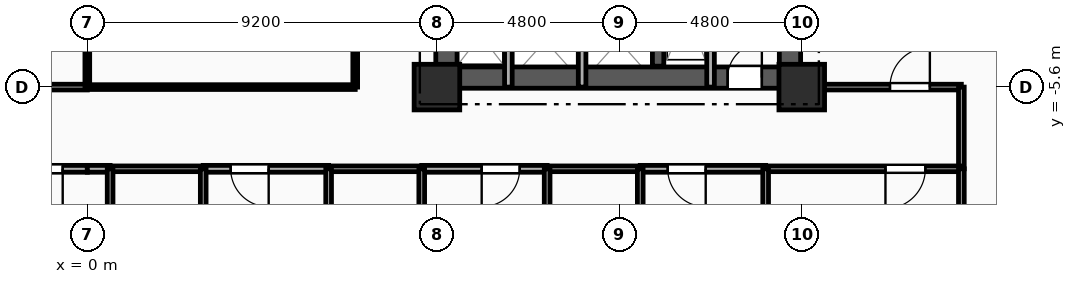
"""IFC4 building model, lengths in metres.
Left out: names, types, materials, properties, quantities, classifications, styles, units other than length and angle.
Written with IfcOpenShell. Run it as: python <this file> out.ifc"""

import sys

from ifc_helpers import new_model, si_unit, direction, frame, frame_2d, origin, origin_2d, place, context, subcontext, project, spatial, rectangle, extrude, element, fill, save


model = new_model("IFC4")
c1 = context("Model", 3, precision=1e-05, world=origin(), true_north=direction((0.0, 1.0)))
c2 = subcontext(c1, "Body", "Model", "MODEL_VIEW")
j1 = project(units=[si_unit("LENGTHUNIT", "METRE"), si_unit("PLANEANGLEUNIT", "RADIAN")], contexts=[c1])
p1 = place(None, origin())
s1 = spatial("IfcSite", under=j1, at=p1, CompositionType="ELEMENT")
p2 = place(p1, origin())
s2 = spatial("IfcBuilding", under=s1, at=p2, CompositionType="ELEMENT")
p3 = place(p2, frame((0.0, 0.0, 67.2)))
s3 = spatial("IfcBuildingStorey", under=s2, at=p3, CompositionType="ELEMENT", Elevation=67.2)
for number, where, z_axis, x_axis in (
    (1, (9.2, -5.6, 0.0), (0.0, 0.0, 1.0), (1.0, 0.0, 0.0)),
    (2, (18.8, -5.6, 0.0), (0.0, 0.0, 1.0), (1.0, 0.0, 0.0)),
):
    element("IfcColumn", number, at=place(p3, frame(where, z_axis=z_axis, x_axis=x_axis)), inside=s3, PredefinedType="COLUMN", context=c2, shape_type="SweptSolid", body=[
        extrude(rectangle(XDim=1.2, YDim=1.2, at=origin_2d()), origin(), (0.0, 0.0, 1.0), 3.35),
    ])
p4 = place(p3, frame((9.2, -5.35, 0.0), z_axis=(0.0, 0.0, 1.0), x_axis=(1.0, 0.0, 0.0)))
e3 = element("IfcWall", 3, at=p4, inside=s3, PredefinedType="SHEAR", context=c2, shape_type="SweptSolid", body=[
    extrude(rectangle(XDim=9.6, YDim=0.56, at=frame_2d((4.8, 0.0))), origin(), (0.0, 0.0, 1.0), 3.035),
])
p5 = place(p4, frame((7.65, 0.0, 0.0)))
e4 = element("IfcOpeningElement", 4, at=p5, cuts=e3, PredefinedType="OPENING", context=c2, shape_type="SweptSolid", body=[
    extrude(rectangle(XDim=0.9, YDim=2.1, at=frame_2d((0.45, 1.05))), frame((0.0, 0.29, 0.0), z_axis=(0.0, -1.0, 0.0), x_axis=(1.0, 0.0, 0.0)), (0.0, 0.0, 1.0), 0.58),
])
p6 = place(p3, frame((9.45, -5.05, 0.0), z_axis=(0.0, 0.0, 1.0), x_axis=(0.0, 1.0, 0.0)))
e5 = element("IfcWall", 5, at=p6, inside=s3, PredefinedType="SHEAR", context=c2, shape_type="SweptSolid", body=[
    extrude(rectangle(XDim=10.1, YDim=0.56, at=frame_2d((5.05, 0.0))), origin(), (0.0, 0.0, 1.0), 3.035),
])
p7 = place(p6, frame((7.15, 0.0, 0.0)))
e6 = element("IfcOpeningElement", 6, at=p7, cuts=e5, PredefinedType="OPENING", context=c2, shape_type="SweptSolid", body=[
    extrude(rectangle(XDim=0.9, YDim=2.1, at=frame_2d((0.45, 1.05))), frame((0.0, 0.29, 0.0), z_axis=(0.0, -1.0, 0.0), x_axis=(1.0, 0.0, 0.0)), (0.0, 0.0, 1.0), 0.58),
])
p8 = place(p6, frame((2.4, 0.0, 0.0)))
e7 = element("IfcOpeningElement", 7, at=p8, cuts=e5, PredefinedType="OPENING", context=c2, shape_type="SweptSolid", body=[
    extrude(rectangle(XDim=1.2, YDim=2.15, at=frame_2d((0.6, 1.075))), frame((0.0, 0.29, 0.0), z_axis=(0.0, -1.0, 0.0), x_axis=(1.0, 0.0, 0.0)), (0.0, 0.0, 1.0), 0.58),
])
p9 = place(p3, frame((18.49, -5.05, 0.0), z_axis=(0.0, 0.0, 1.0), x_axis=(0.0, 1.0, 0.0)))
e8 = element("IfcWall", 8, at=p9, inside=s3, PredefinedType="SHEAR", context=c2, shape_type="SweptSolid", body=[
    extrude(rectangle(XDim=10.1, YDim=0.56, at=frame_2d((5.05, 0.0))), origin(), (0.0, 0.0, 1.0), 3.035),
])
p10 = place(p3, frame((15.02, -5.05, 0.0), z_axis=(0.0, 0.0, 1.0), x_axis=(0.0, 1.0, 0.0)))
e9 = element("IfcWall", 9, at=p10, inside=s3, PredefinedType="SHEAR", context=c2, shape_type="SweptSolid", body=[
    extrude(rectangle(XDim=10.1, YDim=0.3, at=frame_2d((5.05, 0.0))), origin(), (0.0, 0.0, 1.0), 3.035),
])
p11 = place(p3, frame((16.4, -2.11, 0.0), z_axis=(0.0, 0.0, 1.0), x_axis=(0.0, -1.0, 0.0)))
e10 = element("IfcWall", 10, at=p11, inside=s3, PredefinedType="PARTITIONING", context=c2, shape_type="SweptSolid", body=[
    extrude(rectangle(XDim=3.49, YDim=0.2, at=frame_2d((1.745, 0.0))), origin(), (0.0, 0.0, 1.0), 3.035),
])
for number, where, z_axis, x_axis in (
    (11, (11.08, -5.6, 0.0), (0.0, 0.0, 1.0), (0.0, 1.0, 0.0)),
    (12, (13.02, -5.6, 0.0), (0.0, 0.0, 1.0), (0.0, 1.0, 0.0)),
):
    element("IfcWall", number, at=place(p3, frame(where, z_axis=z_axis, x_axis=x_axis)), inside=s3, PredefinedType="PARTITIONING", context=c2, shape_type="SweptSolid", body=[
        extrude(rectangle(XDim=2.25, YDim=0.2, at=frame_2d((1.125, 0.0))), origin(), (0.0, 0.0, 1.0), 3.035),
    ])
p12 = place(p3, frame((0.0, -7.75, 0.0), z_axis=(0.0, 0.0, 1.0), x_axis=(-1.0, 0.0, 0.0)))
e13 = element("IfcWall", 13, at=p12, inside=s3, PredefinedType="PARTITIONING", context=c2, shape_type="SweptSolid", body=[
    extrude(rectangle(XDim=2.7, YDim=0.18, at=frame_2d((1.35, 0.0))), origin(), (0.0, 0.0, 1.0), 3.035),
])
p13 = place(p12, frame((0.647, 0.0, 0.0)))
e14 = element("IfcOpeningElement", 14, at=p13, cuts=e13, PredefinedType="OPENING", context=c2, shape_type="SweptSolid", body=[
    extrude(rectangle(XDim=1.0, YDim=2.15, at=frame_2d((0.5, 1.075))), frame((0.0, 0.1, 0.0), z_axis=(0.0, -1.0, 0.0), x_axis=(1.0, 0.0, 0.0)), (0.0, 0.0, 1.0), 0.2),
])
p14 = place(p3, frame((-7.05, -5.6, 0.0), z_axis=(0.0, 0.0, 1.0), x_axis=(1.0, 0.0, 0.0)))
e15 = element("IfcWall", 15, at=p14, inside=s3, PredefinedType="PARTITIONING", context=c2, shape_type="SweptSolid", body=[
    extrude(rectangle(XDim=7.05, YDim=0.15, at=frame_2d((3.525, 0.0))), origin(), (0.0, 0.0, 1.0), 2.52),
])
p15 = place(p3, frame((18.8, -5.6, 0.0), z_axis=(0.0, 0.0, 1.0), x_axis=(1.0, 0.0, 0.0)))
e16 = element("IfcWall", 16, at=p15, inside=s3, PredefinedType="PARTITIONING", context=c2, shape_type="SweptSolid", body=[
    extrude(rectangle(XDim=4.2, YDim=0.15, at=frame_2d((2.1, 0.0))), origin(), (0.0, 0.0, 1.0), 3.035),
])
p16 = place(p15, frame((2.321, 0.0, 0.0)))
e17 = element("IfcOpeningElement", 17, at=p16, cuts=e16, PredefinedType="OPENING", context=c2, shape_type="SweptSolid", body=[
    extrude(rectangle(XDim=1.05, YDim=2.15, at=frame_2d((0.525, 1.075))), frame((0.0, 0.085, 0.0), z_axis=(0.0, -1.0, 0.0), x_axis=(1.0, 0.0, 0.0)), (0.0, 0.0, 1.0), 0.17),
])
p17 = place(p3, frame((23.0, -5.6, 0.0), z_axis=(0.0, 0.0, 1.0), x_axis=(0.0, -1.0, 0.0)))
e18 = element("IfcWall", 18, at=p17, inside=s3, PredefinedType="PARTITIONING", context=c2, shape_type="SweptSolid", body=[
    extrude(rectangle(XDim=2.15, YDim=0.15, at=frame_2d((1.075, 0.0))), origin(), (0.0, 0.0, 1.0), 3.035),
])
p18 = place(p3, frame((0.6, -7.75, 0.0), z_axis=(0.0, 0.0, 1.0), x_axis=(-1.0, 0.0, 0.0)))
e19 = element("IfcWall", 19, at=p18, inside=s3, PredefinedType="PARTITIONING", context=c2, shape_type="SweptSolid", body=[
    extrude(rectangle(XDim=0.6, YDim=0.18, at=frame_2d((0.3, 0.0))), origin(), (0.0, 0.0, 1.0), 3.035),
])
p19 = place(p3, frame((6.35, -7.75, 0.0), z_axis=(0.0, 0.0, 1.0), x_axis=(-1.0, 0.0, 0.0)))
e20 = element("IfcWall", 20, at=p19, inside=s3, PredefinedType="PARTITIONING", context=c2, shape_type="SweptSolid", body=[
    extrude(rectangle(XDim=3.3, YDim=0.18, at=frame_2d((1.65, 0.0))), origin(), (0.0, 0.0, 1.0), 3.035),
])
p20 = place(p19, frame((1.577, 0.0, 0.0)))
e21 = element("IfcOpeningElement", 21, at=p20, cuts=e20, PredefinedType="OPENING", context=c2, shape_type="SweptSolid", body=[
    extrude(rectangle(XDim=1.0, YDim=2.15, at=frame_2d((0.5, 1.075))), frame((0.0, 0.1, 0.0), z_axis=(0.0, -1.0, 0.0), x_axis=(1.0, 0.0, 0.0)), (0.0, 0.0, 1.0), 0.2),
])
p21 = place(p3, frame((3.05, -7.75, 0.0), z_axis=(0.0, 0.0, 1.0), x_axis=(-1.0, 0.0, 0.0)))
e22 = element("IfcWall", 22, at=p21, inside=s3, PredefinedType="PLUMBINGWALL", context=c2, shape_type="SweptSolid", body=[
    extrude(rectangle(XDim=2.45, YDim=0.15, at=frame_2d((1.225, 0.0))), origin(), (0.0, 0.0, 1.0), 3.035),
])
p22 = place(p3, frame((12.1, -7.75, 0.0), z_axis=(0.0, 0.0, 1.0), x_axis=(-1.0, 0.0, 0.0)))
e23 = element("IfcWall", 23, at=p22, inside=s3, PredefinedType="PARTITIONING", context=c2, shape_type="SweptSolid", body=[
    extrude(rectangle(XDim=3.3, YDim=0.18, at=frame_2d((1.65, 0.0))), origin(), (0.0, 0.0, 1.0), 3.035),
])
p23 = place(p22, frame((0.722, 0.0, 0.0)))
e24 = element("IfcOpeningElement", 24, at=p23, cuts=e23, PredefinedType="OPENING", context=c2, shape_type="SweptSolid", body=[
    extrude(rectangle(XDim=1.0, YDim=2.15, at=frame_2d((0.5, 1.075))), frame((0.0, 0.1, 0.0), z_axis=(0.0, -1.0, 0.0), x_axis=(1.0, 0.0, 0.0)), (0.0, 0.0, 1.0), 0.2),
])
p24 = place(p3, frame((8.8, -7.75, 0.0), z_axis=(0.0, 0.0, 1.0), x_axis=(-1.0, 0.0, 0.0)))
e25 = element("IfcWall", 25, at=p24, inside=s3, PredefinedType="PLUMBINGWALL", context=c2, shape_type="SweptSolid", body=[
    extrude(rectangle(XDim=2.45, YDim=0.15, at=frame_2d((1.225, 0.0))), origin(), (0.0, 0.0, 1.0), 3.035),
])
p25 = place(p3, frame((17.85, -7.75, 0.0), z_axis=(0.0, 0.0, 1.0), x_axis=(-1.0, 0.0, 0.0)))
e26 = element("IfcWall", 26, at=p25, inside=s3, PredefinedType="PARTITIONING", context=c2, shape_type="SweptSolid", body=[
    extrude(rectangle(XDim=3.3, YDim=0.18, at=frame_2d((1.65, 0.0))), origin(), (0.0, 0.0, 1.0), 3.035),
])
p26 = place(p25, frame((1.577, 0.0, 0.0)))
e27 = element("IfcOpeningElement", 27, at=p26, cuts=e26, PredefinedType="OPENING", context=c2, shape_type="SweptSolid", body=[
    extrude(rectangle(XDim=1.0, YDim=2.15, at=frame_2d((0.5, 1.075))), frame((0.0, 0.1, 0.0), z_axis=(0.0, -1.0, 0.0), x_axis=(1.0, 0.0, 0.0)), (0.0, 0.0, 1.0), 0.2),
])
p27 = place(p3, frame((14.55, -7.75, 0.0), z_axis=(0.0, 0.0, 1.0), x_axis=(-1.0, 0.0, 0.0)))
e28 = element("IfcWall", 28, at=p27, inside=s3, PredefinedType="PLUMBINGWALL", context=c2, shape_type="SweptSolid", body=[
    extrude(rectangle(XDim=2.45, YDim=0.15, at=frame_2d((1.225, 0.0))), origin(), (0.0, 0.0, 1.0), 3.035),
])
p28 = place(p3, frame((23.0, -7.75, 0.0), z_axis=(0.0, 0.0, 1.0), x_axis=(-1.0, 0.0, 0.0)))
e29 = element("IfcWall", 29, at=p28, inside=s3, PredefinedType="PARTITIONING", context=c2, shape_type="SweptSolid", body=[
    extrude(rectangle(XDim=5.15, YDim=0.15, at=frame_2d((2.575, 0.0))), origin(), (0.0, 0.0, 1.0), 3.035),
])
p29 = place(p28, frame((0.948, 0.0, 0.0)))
e30 = element("IfcOpeningElement", 30, at=p29, cuts=e29, PredefinedType="OPENING", context=c2, shape_type="SweptSolid", body=[
    extrude(rectangle(XDim=1.05, YDim=2.15, at=frame_2d((0.525, 1.075))), frame((0.0, 0.085, 0.0), z_axis=(0.0, -1.0, 0.0), x_axis=(1.0, 0.0, 0.0)), (0.0, 0.0, 1.0), 0.17),
])
p30 = place(p3, frame((0.0, -5.6, 0.0), z_axis=(0.0, 0.0, 1.0), x_axis=(1.0, 0.0, 0.0)))
e31 = element("IfcWall", 31, at=p30, inside=s3, PredefinedType="PARTITIONING", context=c2, shape_type="SweptSolid", body=[
    extrude(rectangle(XDim=7.05, YDim=0.125, at=frame_2d((3.525, 0.0))), origin(), (0.0, 0.0, 1.0), 2.52),
])
p31 = place(p3, frame((7.05, -5.6, 0.0), z_axis=(0.0, 0.0, 1.0), x_axis=(0.0, 1.0, 0.0)))
e32 = element("IfcWall", 32, at=p31, inside=s3, PredefinedType="PARTITIONING", context=c2, shape_type="SweptSolid", body=[
    extrude(rectangle(XDim=14.1, YDim=0.125, at=frame_2d((7.05, 0.0))), origin(), (0.0, 0.0, 1.0), 3.035),
])
p32 = place(p31, frame((5.076, 0.0, 0.0)))
e33 = element("IfcOpeningElement", 33, at=p32, cuts=e32, PredefinedType="OPENING", context=c2, shape_type="SweptSolid", body=[
    extrude(rectangle(XDim=0.95, YDim=2.1, at=frame_2d((0.475, 1.05))), frame((0.0, 0.073, 0.0), z_axis=(0.0, -1.0, 0.0), x_axis=(1.0, 0.0, 0.0)), (0.0, 0.0, 1.0), 0.145),
])
p33 = place(p3, frame((23.0, -19.4, 0.0), z_axis=(0.0, 0.0, 1.0), x_axis=(0.0, 1.0, 0.0)))
e34 = element("IfcWall", 34, at=p33, inside=s3, PredefinedType="PARTITIONING", context=c2, shape_type="SweptSolid", body=[
    extrude(rectangle(XDim=11.65, YDim=0.15, at=frame_2d((5.825, 0.0))), origin(), (0.0, 0.0, 1.0), 3.035),
])
for number, where, z_axis, x_axis in (
    (35, (0.6, -7.75, 0.0), (0.0, 0.0, 1.0), (0.0, -1.0, 0.0)),
    (36, (3.05, -9.9, 0.0), (0.0, 0.0, 1.0), (0.0, 1.0, 0.0)),
    (37, (6.35, -7.75, 0.0), (0.0, 0.0, 1.0), (0.0, -1.0, 0.0)),
    (38, (8.8, -9.9, 0.0), (0.0, 0.0, 1.0), (0.0, 1.0, 0.0)),
    (39, (12.1, -7.75, 0.0), (0.0, 0.0, 1.0), (0.0, -1.0, 0.0)),
    (40, (14.55, -9.9, 0.0), (0.0, 0.0, 1.0), (0.0, 1.0, 0.0)),
):
    element("IfcWall", number, at=place(p3, frame(where, z_axis=z_axis, x_axis=x_axis)), inside=s3, PredefinedType="PLUMBINGWALL", context=c2, shape_type="SweptSolid", body=[
        extrude(rectangle(XDim=2.15, YDim=0.15, at=frame_2d((1.075, 0.0))), origin(), (0.0, 0.0, 1.0), 3.035),
    ])
p34 = place(p3, frame((17.85, -7.75, 0.0), z_axis=(0.0, 0.0, 1.0), x_axis=(0.0, -1.0, 0.0)))
e41 = element("IfcWall", 41, at=p34, inside=s3, PredefinedType="PARTITIONING", context=c2, shape_type="SweptSolid", body=[
    extrude(rectangle(XDim=11.65, YDim=0.15, at=frame_2d((5.825, 0.0))), origin(), (0.0, 0.0, 1.0), 3.035),
])
p35 = place(p3, frame((0.0, 8.5, 0.0), z_axis=(0.0, 0.0, 1.0), x_axis=(0.0, -1.0, 0.0)))
e42 = element("IfcWall", 42, at=p35, inside=s3, PredefinedType="PARTITIONING", context=c2, shape_type="SweptSolid", body=[
    extrude(rectangle(XDim=14.1, YDim=0.125, at=frame_2d((7.05, 0.0))), origin(), (0.0, 0.0, 1.0), 3.035),
])
p36 = place(p5, origin())
e43 = element("IfcDoor", 43, at=p36, inside=s3, OperationType="SINGLE_SWING_RIGHT", PredefinedType="DOOR", context=c2, shape_type="SweptSolid", body=[
    extrude(rectangle(XDim=0.9, YDim=2.1, at=frame_2d((0.45, 1.05))), frame((0.0, 0.025, 0.0), z_axis=(0.0, -1.0, 0.0), x_axis=(1.0, 0.0, 0.0)), (0.0, 0.0, 1.0), 0.05),
])
fill(e4, e43)
p37 = place(p13, origin())
e44 = element("IfcDoor", 44, at=p37, inside=s3, OperationType="SINGLE_SWING_LEFT", PredefinedType="DOOR", context=c2, shape_type="SweptSolid", body=[
    extrude(rectangle(XDim=1.0, YDim=2.15, at=frame_2d((0.5, 1.075))), frame((0.0, 0.025, 0.0), z_axis=(0.0, -1.0, 0.0), x_axis=(1.0, 0.0, 0.0)), (0.0, 0.0, 1.0), 0.05),
])
fill(e14, e44)
p38 = place(p16, origin())
e45 = element("IfcDoor", 45, at=p38, inside=s3, OperationType="SINGLE_SWING_RIGHT", PredefinedType="DOOR", context=c2, shape_type="SweptSolid", body=[
    extrude(rectangle(XDim=1.05, YDim=2.15, at=frame_2d((0.525, 1.075))), frame((0.0, 0.025, 0.0), z_axis=(0.0, -1.0, 0.0), x_axis=(1.0, 0.0, 0.0)), (0.0, 0.0, 1.0), 0.05),
])
fill(e17, e45)
p39 = place(p20, origin())
e46 = element("IfcDoor", 46, at=p39, inside=s3, OperationType="SINGLE_SWING_LEFT", PredefinedType="DOOR", context=c2, shape_type="SweptSolid", body=[
    extrude(rectangle(XDim=1.0, YDim=2.15, at=frame_2d((0.5, 1.075))), frame((0.0, 0.025, 0.0), z_axis=(0.0, -1.0, 0.0), x_axis=(1.0, 0.0, 0.0)), (0.0, 0.0, 1.0), 0.05),
])
fill(e21, e46)
p40 = place(p23, origin())
e47 = element("IfcDoor", 47, at=p40, inside=s3, OperationType="SINGLE_SWING_RIGHT", PredefinedType="DOOR", context=c2, shape_type="SweptSolid", body=[
    extrude(rectangle(XDim=1.0, YDim=2.15, at=frame_2d((0.5, 1.075))), frame((0.0, 0.025, 0.0), z_axis=(0.0, -1.0, 0.0), x_axis=(1.0, 0.0, 0.0)), (0.0, 0.0, 1.0), 0.05),
])
fill(e24, e47)
p41 = place(p26, origin())
e48 = element("IfcDoor", 48, at=p41, inside=s3, OperationType="SINGLE_SWING_LEFT", PredefinedType="DOOR", context=c2, shape_type="SweptSolid", body=[
    extrude(rectangle(XDim=1.0, YDim=2.15, at=frame_2d((0.5, 1.075))), frame((0.0, 0.025, 0.0), z_axis=(0.0, -1.0, 0.0), x_axis=(1.0, 0.0, 0.0)), (0.0, 0.0, 1.0), 0.05),
])
fill(e27, e48)
p42 = place(p29, origin())
e49 = element("IfcDoor", 49, at=p42, inside=s3, OperationType="SINGLE_SWING_RIGHT", PredefinedType="DOOR", context=c2, shape_type="SweptSolid", body=[
    extrude(rectangle(XDim=1.05, YDim=2.15, at=frame_2d((0.525, 1.075))), frame((0.0, 0.025, 0.0), z_axis=(0.0, -1.0, 0.0), x_axis=(1.0, 0.0, 0.0)), (0.0, 0.0, 1.0), 0.05),
])
fill(e30, e49)
save(model, sys.argv[1])
